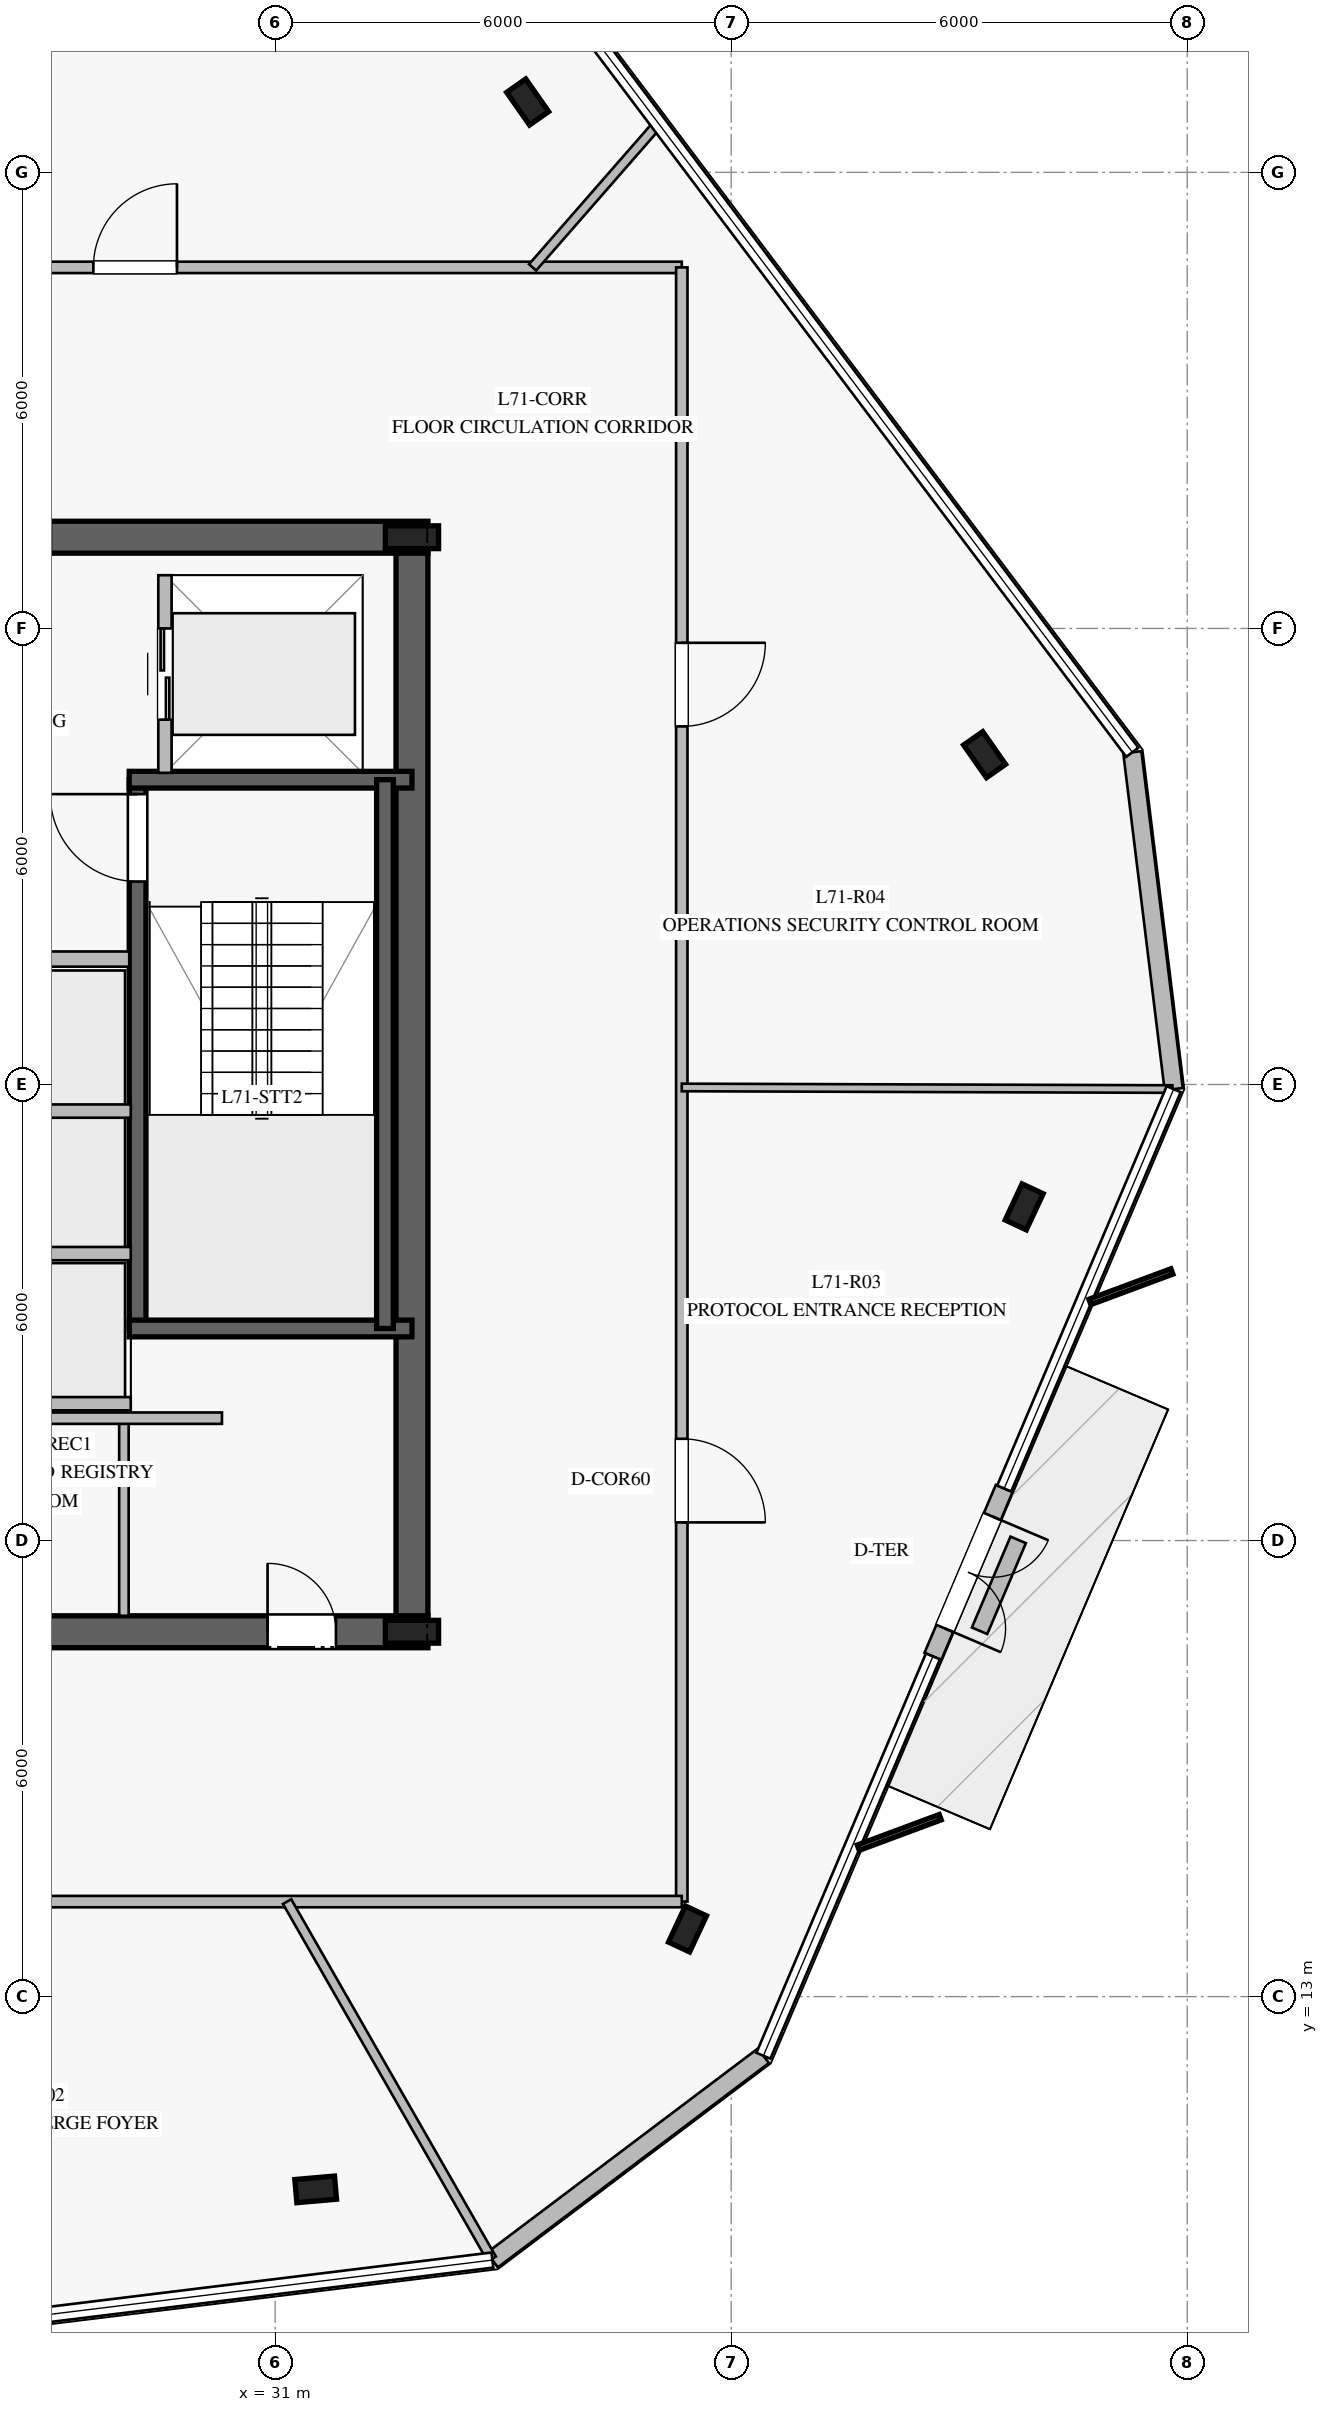
"""IFC4 building model, lengths in metres.
Left out: names, types, materials, properties, quantities, classifications, styles, units other than length and angle.
Written with IfcOpenShell. Run it as: python <this file> out.ifc"""

import sys

from ifc_helpers import new_model, si_unit, direction, frame, frame_2d, origin, origin_2d, place, context, subcontext, project, spatial, rectangle, i_section, extrude, element, fill, save


model = new_model("IFC4")
c1 = context("Model", 3, precision=1e-05, world=origin(), true_north=direction((0.0, 1.0)))
c2 = subcontext(c1, "Body", "Model", "MODEL_VIEW")
j1 = project(units=[si_unit("LENGTHUNIT", "METRE"), si_unit("PLANEANGLEUNIT", "RADIAN")], contexts=[c1])
p1 = place(None, origin())
s1 = spatial("IfcSite", under=j1, at=p1, CompositionType="ELEMENT")
p2 = place(p1, origin())
s2 = spatial("IfcBuilding", under=s1, at=p2, CompositionType="ELEMENT")
p3 = place(p2, frame((0.0, 0.0, 294.2)))
s3 = spatial("IfcBuildingStorey", under=s2, at=p3, CompositionType="ELEMENT", Elevation=294.2)
p4 = place(p3, frame((16.99, 17.8, 0.0), z_axis=(0.0, 0.0, 1.0), x_axis=(1.0, 0.0, 0.0)))
e1 = element("IfcWall", 1, at=p4, inside=s3, PredefinedType="SHEAR", context=c2, shape_type="SweptSolid", body=[
    extrude(rectangle(XDim=16.02, YDim=0.42, at=frame_2d((8.01, 0.0))), origin(), (0.0, 0.0, 1.0), 3.78),
])
p5 = place(p4, frame((4.96, 0.0, 0.0)))
e2 = element("IfcOpeningElement", 2, at=p5, cuts=e1, PredefinedType="OPENING", context=c2, shape_type="SweptSolid", body=[
    extrude(rectangle(XDim=1.2, YDim=2.25, at=frame_2d((0.6, 1.125))), frame((0.0, 0.22, 0.0), z_axis=(0.0, -1.0, 0.0), x_axis=(1.0, 0.0, 0.0)), (0.0, 0.0, 1.0), 0.44),
])
p6 = place(p4, frame((13.91, 0.0, 0.0)))
e3 = element("IfcOpeningElement", 3, at=p6, cuts=e1, PredefinedType="OPENING", context=c2, shape_type="SweptSolid", body=[
    extrude(rectangle(XDim=0.9, YDim=2.1, at=frame_2d((0.45, 1.05))), frame((0.0, 0.22, 0.0), z_axis=(0.0, -1.0, 0.0), x_axis=(1.0, 0.0, 0.0)), (0.0, 0.0, 1.0), 0.44),
])
p7 = place(p4, frame((9.16, 0.0, 0.0)))
e4 = element("IfcOpeningElement", 4, at=p7, cuts=e1, PredefinedType="OPENING", context=c2, shape_type="SweptSolid", body=[
    extrude(rectangle(XDim=1.1, YDim=2.2, at=frame_2d((0.55, 1.1))), frame((0.0, 0.22, 0.0), z_axis=(0.0, -1.0, 0.0), x_axis=(1.0, 0.0, 0.0)), (0.0, 0.0, 1.0), 0.44),
])
p8 = place(p3, frame((33.01, 32.2, 0.0), z_axis=(0.0, 0.0, 1.0), x_axis=(-1.0, 0.0, 0.0)))
e5 = element("IfcWall", 5, at=p8, inside=s3, PredefinedType="SHEAR", context=c2, shape_type="SweptSolid", body=[
    extrude(rectangle(XDim=16.02, YDim=0.42, at=frame_2d((8.01, 0.0))), origin(), (0.0, 0.0, 1.0), 3.78),
])
p9 = place(p8, frame((4.96, 0.0, 0.0)))
e6 = element("IfcOpeningElement", 6, at=p9, cuts=e5, PredefinedType="OPENING", context=c2, shape_type="SweptSolid", body=[
    extrude(rectangle(XDim=1.2, YDim=2.25, at=frame_2d((0.6, 1.125))), frame((0.0, 0.22, 0.0), z_axis=(0.0, -1.0, 0.0), x_axis=(1.0, 0.0, 0.0)), (0.0, 0.0, 1.0), 0.44),
])
p10 = place(p8, frame((9.785, 0.0, 0.0)))
e7 = element("IfcOpeningElement", 7, at=p10, cuts=e5, PredefinedType="OPENING", context=c2, shape_type="SweptSolid", body=[
    extrude(rectangle(XDim=1.1, YDim=2.2, at=frame_2d((0.55, 1.1))), frame((0.0, 0.22, 0.0), z_axis=(0.0, -1.0, 0.0), x_axis=(1.0, 0.0, 0.0)), (0.0, 0.0, 1.0), 0.44),
])
p11 = place(p3, frame((32.8, 18.01, 0.0), z_axis=(0.0, 0.0, 1.0), x_axis=(0.0, 1.0, 0.0)))
e8 = element("IfcWall", 8, at=p11, inside=s3, PredefinedType="SHEAR", context=c2, shape_type="SweptSolid", body=[
    extrude(rectangle(XDim=13.98, YDim=0.42, at=frame_2d((6.99, 0.0))), origin(), (0.0, 0.0, 1.0), 3.78),
])
for number, where, z_axis, x_axis in (
    (9, (32.8, 17.8, 0.0), (0.0, 0.0, 1.0), (1.0, 0.0, 0.0)),
    (10, (32.8, 32.2, 0.0), (0.0, 0.0, 1.0), (1.0, 0.0, 0.0)),
):
    element("IfcColumn", number, at=place(p3, frame(where, z_axis=z_axis, x_axis=x_axis)), inside=s3, PredefinedType="COLUMN", context=c2, shape_type="SweptSolid", body=[
        extrude(i_section(OverallWidth=0.3, OverallDepth=0.7, WebThickness=0.017, FlangeThickness=0.032, at=origin_2d()), origin(), (0.0, 0.0, 1.0), 4.0),
    ])
p12 = place(p3, frame((29.19, 21.79, 0.0), z_axis=(0.0, 0.0, 1.0), x_axis=(0.0, 1.0, 0.0)))
e11 = element("IfcWall", 11, at=p12, inside=s3, PredefinedType="SOLIDWALL", context=c2, shape_type="SweptSolid", body=[
    extrude(rectangle(XDim=7.22, YDim=0.22, at=frame_2d((3.61, 0.0))), origin(), (0.0, 0.0, 1.0), 3.78),
])
p13 = place(p12, frame((5.88, 0.0, 0.0)))
e12 = element("IfcOpeningElement", 12, at=p13, cuts=e11, PredefinedType="OPENING", context=c2, shape_type="SweptSolid", body=[
    extrude(rectangle(XDim=1.15, YDim=2.2, at=frame_2d((0.575, 1.1))), frame((0.0, 0.12, 0.0), z_axis=(0.0, -1.0, 0.0), x_axis=(1.0, 0.0, 0.0)), (0.0, 0.0, 1.0), 0.24),
])
for number, where, z_axis, x_axis in (
    (13, (29.08, 21.79, 0.0), (0.0, 0.0, 1.0), (1.0, 0.0, 0.0)),
    (14, (29.08, 29.01, 0.0), (0.0, 0.0, 1.0), (1.0, 0.0, 0.0)),
):
    element("IfcWall", number, at=place(p3, frame(where, z_axis=z_axis, x_axis=x_axis)), inside=s3, PredefinedType="SOLIDWALL", context=c2, shape_type="SweptSolid", body=[
        extrude(rectangle(XDim=3.72, YDim=0.22, at=frame_2d((1.86, 0.0))), origin(), (0.0, 0.0, 1.0), 3.78),
    ])
p14 = place(p3, frame((32.445, 29.01, 0.0), z_axis=(0.0, 0.0, 1.0), x_axis=(0.0, -1.0, 0.0)))
e15 = element("IfcWall", 15, at=p14, inside=s3, PredefinedType="SOLIDWALL", context=c2, shape_type="SweptSolid", body=[
    extrude(rectangle(XDim=7.22, YDim=0.22, at=frame_2d((3.61, 0.0))), origin(), (0.0, 0.0, 1.0), 3.78),
])
for number, where, z_axis, x_axis in (
    (16, (31.533, 10.464, 0.0), (0.0, 0.0, 1.0), (0.996, 0.087, 0.0)),
    (17, (36.425, 13.89, 0.0), (0.0, 0.0, 1.0), (0.423, 0.906, 0.0)),
    (18, (40.855, 23.39, 0.0), (0.0, 0.0, 1.0), (0.423, 0.906, 0.0)),
    (19, (40.334, 29.339, 0.0), (0.0, 0.0, 1.0), (-0.574, 0.819, 0.0)),
    (20, (34.322, 37.926, 0.0), (0.0, 0.0, 1.0), (-0.574, 0.819, 0.0)),
):
    element("IfcColumn", number, at=place(p3, frame(where, z_axis=z_axis, x_axis=x_axis)), inside=s3, PredefinedType="COLUMN", context=c2, shape_type="SweptSolid", body=[
        extrude(i_section(OverallWidth=0.306, OverallDepth=0.524, WebThickness=0.021, FlangeThickness=0.04, at=origin_2d()), origin(), (0.0, 0.0, 1.0), 4.0),
    ])
p15 = place(p3, frame((33.858, 9.534, 0.0), z_axis=(0.0, 0.0, 1.0), x_axis=(0.798560985543, 0.601913907772, 0.0)))
e21 = element("IfcWall", 21, at=p15, inside=s3, PredefinedType="STANDARD", context=c2, shape_type="SweptSolid", body=[
    extrude(rectangle(XDim=4.466, YDim=0.24, at=frame_2d((2.233, 0.0))), origin(), (0.0, 0.0, 1.0), 3.78),
])
p16 = place(p3, frame((39.654, 17.476, 0.0), z_axis=(0.0, 0.0, 1.0), x_axis=(0.390847654615, 0.920455382342, 0.0)))
e22 = element("IfcWall", 22, at=p16, inside=s3, PredefinedType="STANDARD", context=c2, shape_type="SweptSolid", body=[
    extrude(rectangle(XDim=2.4, YDim=0.24, at=frame_2d((1.2, 0.0))), origin(), (0.0, 0.0, 1.0), 3.78),
])
p17 = place(p16, frame((0.4, 0.0, 0.0)))
e23 = element("IfcOpeningElement", 23, at=p17, cuts=e22, PredefinedType="OPENING", context=c2, shape_type="SweptSolid", body=[
    extrude(rectangle(XDim=1.6, YDim=2.25, at=frame_2d((0.8, 1.125))), frame((0.0, 0.13, 0.0), z_axis=(0.0, -1.0, 0.0), x_axis=(1.0, 0.0, 0.0)), (0.0, 0.0, 1.0), 0.26),
])
p18 = place(p3, frame((42.822, 24.939, 0.0), z_axis=(0.0, 0.0, 1.0), x_axis=(-0.121813815836, 0.992552967993, 0.0)))
e24 = element("IfcWall", 24, at=p18, inside=s3, PredefinedType="STANDARD", context=c2, shape_type="SweptSolid", body=[
    extrude(rectangle(XDim=4.465, YDim=0.24, at=frame_2d((2.233, 0.0))), origin(), (0.0, 0.0, 1.0), 3.78),
])
p19 = place(p3, frame((40.268, 17.813, 0.0), z_axis=(0.0, 0.0, 1.0), x_axis=(0.390810390969, 0.920471204498, 0.0)))
e25 = element("IfcWall", 25, at=p19, inside=s3, PredefinedType="USERDEFINED", context=c2, shape_type="SweptSolid", body=[
    extrude(rectangle(XDim=1.299, YDim=0.22, at=frame_2d((0.65, 0.0))), origin(), (0.0, 0.0, 1.0), 0.4),
])
p20 = place(p3, frame((25.7, 26.65, 0.0), z_axis=(0.0, 0.0, 1.0), x_axis=(1.0, 0.0, 0.0)))
e26 = element("IfcWall", 26, at=p20, inside=s3, PredefinedType="PARTITIONING", context=c2, shape_type="SweptSolid", body=[
    extrude(rectangle(XDim=3.38, YDim=0.2, at=frame_2d((1.69, 0.0))), origin(), (0.0, 0.0, 1.0), 3.78),
])
p21 = place(p3, frame((29.01, 18.01, 0.0), z_axis=(0.0, 0.0, 1.0), x_axis=(0.0, 1.0, 0.0)))
e27 = element("IfcWall", 27, at=p21, inside=s3, PredefinedType="PARTITIONING", context=c2, shape_type="SweptSolid", body=[
    extrude(rectangle(XDim=2.54, YDim=0.125, at=frame_2d((1.27, 0.0))), origin(), (0.0, 0.0, 1.0), 3.78),
])
p22 = place(p3, frame((24.4, 20.61, 0.0), z_axis=(0.0, 0.0, 1.0), x_axis=(1.0, 0.0, 0.0)))
e28 = element("IfcWall", 28, at=p22, inside=s3, PredefinedType="PARTITIONING", context=c2, shape_type="SweptSolid", body=[
    extrude(rectangle(XDim=5.9, YDim=0.15, at=frame_2d((2.95, 0.0))), origin(), (0.0, 0.0, 1.0), 3.78),
])
for number, where, z_axis, x_axis in (
    (29, (26.75, 20.8, 0.0), (0.0, 0.0, 1.0), (1.0, 0.0, 0.0)),
    (30, (26.75, 22.775, 0.0), (0.0, 0.0, 1.0), (1.0, 0.0, 0.0)),
    (31, (26.75, 24.65, 0.0), (0.0, 0.0, 1.0), (1.0, 0.0, 0.0)),
):
    element("IfcWall", number, at=place(p3, frame(where, z_axis=z_axis, x_axis=x_axis)), inside=s3, PredefinedType="PARTITIONING", context=c2, shape_type="SweptSolid", body=[
        extrude(rectangle(XDim=2.35, YDim=0.175, at=frame_2d((1.175, 0.0))), origin(), (0.0, 0.0, 1.0), 3.78),
    ])
p23 = place(p3, frame((29.55, 29.1, 0.0), z_axis=(0.0, 0.0, 1.0), x_axis=(0.0, 1.0, 0.0)))
e32 = element("IfcWall", 32, at=p23, inside=s3, PredefinedType="PARTITIONING", context=c2, shape_type="SweptSolid", body=[
    extrude(rectangle(XDim=2.6, YDim=0.175, at=frame_2d((1.3, 0.0))), origin(), (0.0, 0.0, 1.0), 3.78),
])
p24 = place(p23, frame((0.7, 0.0, 0.0)))
e33 = element("IfcOpeningElement", 33, at=p24, cuts=e32, PredefinedType="OPENING", context=c2, shape_type="SweptSolid", body=[
    extrude(rectangle(XDim=1.2, YDim=2.2, at=frame_2d((0.6, 1.1))), frame((0.0, 0.098, 0.0), z_axis=(0.0, -1.0, 0.0), x_axis=(1.0, 0.0, 0.0)), (0.0, 0.0, 1.0), 0.195),
])
p25 = place(p3, frame((13.65, 35.75, 0.0), z_axis=(0.0, 0.0, 1.0), x_axis=(1.0, 0.0, 0.0)))
e34 = element("IfcWall", 34, at=p25, inside=s3, PredefinedType="PARTITIONING", context=c2, shape_type="SweptSolid", body=[
    extrude(rectangle(XDim=22.7, YDim=0.15, at=frame_2d((11.35, 0.0))), origin(), (0.0, 0.0, 1.0), 3.02),
])
p26 = place(p25, frame((14.958, 0.0, 0.0)))
e35 = element("IfcOpeningElement", 35, at=p26, cuts=e34, PredefinedType="OPENING", context=c2, shape_type="SweptSolid", body=[
    extrude(rectangle(XDim=1.1, YDim=2.2, at=frame_2d((0.55, 1.1))), frame((0.0, 0.085, 0.0), z_axis=(0.0, -1.0, 0.0), x_axis=(1.0, 0.0, 0.0)), (0.0, 0.0, 1.0), 0.17),
])
p27 = place(p25, frame((4.644, 0.0, 0.0)))
e36 = element("IfcOpeningElement", 36, at=p27, cuts=e34, PredefinedType="OPENING", context=c2, shape_type="SweptSolid", body=[
    extrude(rectangle(XDim=1.1, YDim=2.2, at=frame_2d((0.55, 1.1))), frame((0.0, 0.085, 0.0), z_axis=(0.0, -1.0, 0.0), x_axis=(1.0, 0.0, 0.0)), (0.0, 0.0, 1.0), 0.17),
])
p28 = place(p3, frame((36.35, 35.75, 0.0), z_axis=(0.0, 0.0, 1.0), x_axis=(0.0, -1.0, 0.0)))
e37 = element("IfcWall", 37, at=p28, inside=s3, PredefinedType="PARTITIONING", context=c2, shape_type="SweptSolid", body=[
    extrude(rectangle(XDim=21.5, YDim=0.15, at=frame_2d((10.75, 0.0))), origin(), (0.0, 0.0, 1.0), 3.05),
])
p29 = place(p28, frame((15.411, 0.0, 0.0)))
e38 = element("IfcOpeningElement", 38, at=p29, cuts=e37, PredefinedType="OPENING", context=c2, shape_type="SweptSolid", body=[
    extrude(rectangle(XDim=1.1, YDim=2.2, at=frame_2d((0.55, 1.1))), frame((0.0, 0.085, 0.0), z_axis=(0.0, -1.0, 0.0), x_axis=(1.0, 0.0, 0.0)), (0.0, 0.0, 1.0), 0.17),
])
p30 = place(p28, frame((4.939, 0.0, 0.0)))
e39 = element("IfcOpeningElement", 39, at=p30, cuts=e37, PredefinedType="OPENING", context=c2, shape_type="SweptSolid", body=[
    extrude(rectangle(XDim=1.1, YDim=2.2, at=frame_2d((0.55, 1.1))), frame((0.0, 0.085, 0.0), z_axis=(0.0, -1.0, 0.0), x_axis=(1.0, 0.0, 0.0)), (0.0, 0.0, 1.0), 0.17),
])
p31 = place(p3, frame((36.35, 14.25, 0.0), z_axis=(0.0, 0.0, 1.0), x_axis=(-1.0, 0.0, 0.0)))
e40 = element("IfcWall", 40, at=p31, inside=s3, PredefinedType="PARTITIONING", context=c2, shape_type="SweptSolid", body=[
    extrude(rectangle(XDim=22.7, YDim=0.15, at=frame_2d((11.35, 0.0))), origin(), (0.0, 0.0, 1.0), 3.28),
])
p32 = place(p31, frame((19.356, 0.0, 0.0)))
e41 = element("IfcOpeningElement", 41, at=p32, cuts=e40, PredefinedType="OPENING", context=c2, shape_type="SweptSolid", body=[
    extrude(rectangle(XDim=1.1, YDim=2.2, at=frame_2d((0.55, 1.1))), frame((0.0, 0.085, 0.0), z_axis=(0.0, -1.0, 0.0), x_axis=(1.0, 0.0, 0.0)), (0.0, 0.0, 1.0), 0.17),
])
p33 = place(p31, frame((10.849, 0.0, 0.0)))
e42 = element("IfcOpeningElement", 42, at=p33, cuts=e40, PredefinedType="OPENING", context=c2, shape_type="SweptSolid", body=[
    extrude(rectangle(XDim=1.1, YDim=2.2, at=frame_2d((0.55, 1.1))), frame((0.0, 0.085, 0.0), z_axis=(0.0, -1.0, 0.0), x_axis=(1.0, 0.0, 0.0)), (0.0, 0.0, 1.0), 0.17),
])
p34 = place(p3, frame((31.157, 14.25, 0.0), z_axis=(0.0, 0.0, 1.0), x_axis=(0.497094675542, -0.867696308364, 0.0)))
e43 = element("IfcWall", 43, at=p34, inside=s3, PredefinedType="PARTITIONING", context=c2, shape_type="SweptSolid", body=[
    extrude(rectangle(XDim=5.418, YDim=0.125, at=frame_2d((2.709, 0.0))), origin(), (0.0, 0.0, 1.0), 3.28),
])
p35 = place(p3, frame((36.35, 24.961, 0.0), z_axis=(0.0, 0.0, 1.0), x_axis=(0.999994709784, -0.003252753321, 0.0)))
e44 = element("IfcWall", 44, at=p35, inside=s3, PredefinedType="MOVABLE", context=c2, shape_type="SweptSolid", body=[
    extrude(rectangle(XDim=6.455, YDim=0.1, at=frame_2d((3.228, 0.0))), origin(), (0.0, 0.0, 1.0), 3.28),
])
p36 = place(p3, frame((34.387, 35.75, 0.0), z_axis=(0.0, 0.0, 1.0), x_axis=(0.657903000059, 0.753102677271, 0.0)))
e45 = element("IfcWall", 45, at=p36, inside=s3, PredefinedType="PARTITIONING", context=c2, shape_type="SweptSolid", body=[
    extrude(rectangle(XDim=2.5, YDim=0.125, at=frame_2d((1.25, 0.0))), origin(), (0.0, 0.0, 1.0), 3.28),
])
p37 = place(p17, frame((1.6, 0.0, 0.0), z_axis=(0.0, 0.0, 1.0), x_axis=(-1.0, 0.0, 0.0)))
e46 = element("IfcDoor", 46, at=p37, inside=s3, OperationType="DOUBLE_DOOR_SINGLE_SWING", PredefinedType="DOOR", context=c2, shape_type="SweptSolid", body=[
    extrude(rectangle(XDim=1.6, YDim=2.25, at=frame_2d((0.8, 1.125))), frame((0.0, 0.025, 0.0), z_axis=(0.0, -1.0, 0.0), x_axis=(1.0, 0.0, 0.0)), (0.0, 0.0, 1.0), 0.05),
])
fill(e23, e46)
p38 = place(p13, origin())
e47 = element("IfcDoor", 47, at=p38, inside=s3, OperationType="SINGLE_SWING_RIGHT", PredefinedType="DOOR", context=c2, shape_type="SweptSolid", body=[
    extrude(rectangle(XDim=1.15, YDim=2.2, at=frame_2d((0.575, 1.1))), frame((0.0, 0.025, 0.0), z_axis=(0.0, -1.0, 0.0), x_axis=(1.0, 0.0, 0.0)), (0.0, 0.0, 1.0), 0.05),
])
fill(e12, e47)
p39 = place(p6, origin())
e48 = element("IfcDoor", 48, at=p39, inside=s3, OperationType="SINGLE_SWING_LEFT", PredefinedType="DOOR", context=c2, shape_type="SweptSolid", body=[
    extrude(rectangle(XDim=0.9, YDim=2.1, at=frame_2d((0.45, 1.05))), frame((0.0, 0.025, 0.0), z_axis=(0.0, -1.0, 0.0), x_axis=(1.0, 0.0, 0.0)), (0.0, 0.0, 1.0), 0.05),
])
fill(e3, e48)
p40 = place(p24, origin())
e49 = element("IfcDoor", 49, at=p40, inside=s3, OperationType="DOUBLE_DOOR_SLIDING", PredefinedType="DOOR", context=c2, shape_type="SweptSolid", body=[
    extrude(rectangle(XDim=1.2, YDim=2.2, at=frame_2d((0.6, 1.1))), frame((0.0, 0.025, 0.0), z_axis=(0.0, -1.0, 0.0), x_axis=(1.0, 0.0, 0.0)), (0.0, 0.0, 1.0), 0.05),
])
fill(e33, e49)
p41 = place(p29, origin())
e50 = element("IfcDoor", 50, at=p41, inside=s3, OperationType="SINGLE_SWING_RIGHT", PredefinedType="DOOR", context=c2, shape_type="SweptSolid", body=[
    extrude(rectangle(XDim=1.1, YDim=2.2, at=frame_2d((0.55, 1.1))), frame((0.0, 0.025, 0.0), z_axis=(0.0, -1.0, 0.0), x_axis=(1.0, 0.0, 0.0)), (0.0, 0.0, 1.0), 0.05),
])
fill(e38, e50)
p42 = place(p30, origin())
e51 = element("IfcDoor", 51, at=p42, inside=s3, OperationType="SINGLE_SWING_LEFT", PredefinedType="DOOR", context=c2, shape_type="SweptSolid", body=[
    extrude(rectangle(XDim=1.1, YDim=2.2, at=frame_2d((0.55, 1.1))), frame((0.0, 0.025, 0.0), z_axis=(0.0, -1.0, 0.0), x_axis=(1.0, 0.0, 0.0)), (0.0, 0.0, 1.0), 0.05),
])
fill(e39, e51)
p43 = place(p26, origin())
e52 = element("IfcDoor", 52, at=p43, inside=s3, OperationType="SINGLE_SWING_RIGHT", PredefinedType="DOOR", context=c2, shape_type="SweptSolid", body=[
    extrude(rectangle(XDim=1.1, YDim=2.2, at=frame_2d((0.55, 1.1))), frame((0.0, 0.025, 0.0), z_axis=(0.0, -1.0, 0.0), x_axis=(1.0, 0.0, 0.0)), (0.0, 0.0, 1.0), 0.05),
])
fill(e35, e52)
save(model, sys.argv[1])
